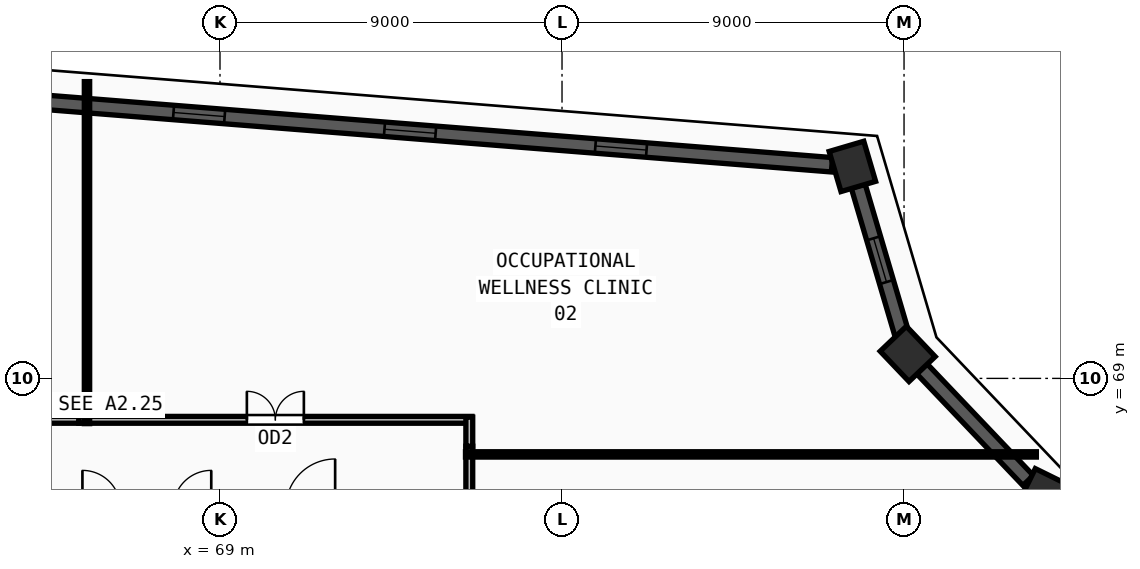
"""IFC4 building model, lengths in metres.
Left out: names, types, materials, properties, quantities, classifications, styles, units other than length and angle.
Written with IfcOpenShell. Run it as: python <this file> out.ifc"""

import sys

from ifc_helpers import new_model, si_unit, direction, frame, frame_2d, origin, origin_2d, place, context, subcontext, project, spatial, rectangle, extrude, source, transform, mapped, element, fill, save


model = new_model("IFC4")
c1 = context("Model", 3, precision=1e-05, world=origin(), true_north=direction((0.0, 1.0)))
c2 = subcontext(c1, "Body", "Model", "MODEL_VIEW")
j1 = project(units=[si_unit("LENGTHUNIT", "METRE"), si_unit("PLANEANGLEUNIT", "RADIAN")], contexts=[c1])
p1 = place(None, origin())
s1 = spatial("IfcSite", under=j1, at=p1, CompositionType="ELEMENT")
p2 = place(p1, origin())
s2 = spatial("IfcBuilding", under=s1, at=p2, CompositionType="ELEMENT")
p3 = place(p2, frame((0.0, 0.0, 286.5)))
s3 = spatial("IfcBuildingStorey", under=s2, at=p3, CompositionType="ELEMENT", Elevation=286.5)
m1 = source(origin(), c2, "Body", "SweptSolid", [
    extrude(rectangle(XDim=1.1, YDim=0.95, at=origin_2d()), origin(), (0.0, 0.0, 1.0), 3.75),
])
for number, where, z_axis, x_axis in (
    (1, (85.641, 74.578, 0.0), (0.0, 0.0, 1.0), (-0.283, 0.959, 0.0)),
    (2, (87.096, 69.644, 0.0), (0.0, 0.0, 1.0), (-0.689, 0.724, 0.0)),
    (3, (90.637, 65.923, 0.0), (0.0, 0.0, 1.0), (0.442, 0.897, 0.0)),
):
    element("IfcColumn", number, at=place(p3, frame(where, z_axis=z_axis, x_axis=x_axis)), inside=s3, PredefinedType="COLUMN", context=c2, shape_type="MappedRepresentation", body=[
        mapped(m1, transform((0.0, 0.0, 0.0), x_axis=(1.0, 0.0, 0.0), y_axis=(0.0, 1.0, 0.0), z_axis=(0.0, 0.0, 1.0), scale=1.0)),
    ])
p4 = place(p3, frame((90.265, 66.314, 0.0), z_axis=(0.0, 0.0, 1.0), x_axis=(-0.689378640733, 0.724401193885, 0.0)))
e4 = element("IfcWall", 4, at=p4, inside=s3, PredefinedType="SOLIDWALL", context=c2, shape_type="SweptSolid", body=[
    extrude(rectangle(XDim=4.057, YDim=0.38, at=frame_2d((2.029, 0.0))), origin(), (0.0, 0.0, 1.0), 3.57),
])
p5 = place(p3, frame((86.943, 70.162, 0.0), z_axis=(0.0, 0.0, 1.0), x_axis=(-0.282780999882, 0.959184500555, 0.0)))
e5 = element("IfcWall", 5, at=p5, inside=s3, PredefinedType="SOLIDWALL", context=c2, shape_type="SweptSolid", body=[
    extrude(rectangle(XDim=4.064, YDim=0.38, at=frame_2d((2.032, 0.0))), origin(), (0.0, 0.0, 1.0), 3.57),
])
m2 = source(origin(), c2, "Body", "SweptSolid", [
    extrude(rectangle(XDim=1.2, YDim=1.9, at=frame_2d((0.6, 0.95))), frame((0.0, 0.2, 0.0), z_axis=(0.0, -1.0, 0.0), x_axis=(1.0, 0.0, 0.0)), (0.0, 0.0, 1.0), 0.4),
])
p6 = place(p5, frame((1.432, 0.0, 0.55)))
e6 = element("IfcOpeningElement", 6, at=p6, cuts=e5, PredefinedType="OPENING", context=c2, shape_type="MappedRepresentation", body=[
    mapped(m2, transform((0.0, 0.0, 0.0), x_axis=(1.0, 0.0, 0.0), y_axis=(0.0, 1.0, 0.0), z_axis=(0.0, 0.0, 1.0), scale=1.0)),
])
p7 = place(p3, frame((85.103, 74.621, 0.0), z_axis=(0.0, 0.0, 1.0), x_axis=(-0.996863155658, 0.079144481122, 0.0)))
e7 = element("IfcWall", 7, at=p7, inside=s3, PredefinedType="SOLIDWALL", context=c2, shape_type="SweptSolid", body=[
    extrude(rectangle(XDim=22.275, YDim=0.38, at=frame_2d((11.137, 0.0))), origin(), (0.0, 0.0, 1.0), 3.57),
])
m3 = source(origin(), c2, "Body", "SweptSolid", [
    extrude(rectangle(XDim=1.35, YDim=1.85, at=frame_2d((0.675, 0.925))), frame((0.0, 0.2, 0.0), z_axis=(0.0, -1.0, 0.0), x_axis=(1.0, 0.0, 0.0)), (0.0, 0.0, 1.0), 0.4),
])
p8 = place(p7, frame((4.894, 0.0, 0.55)))
e8 = element("IfcOpeningElement", 8, at=p8, cuts=e7, PredefinedType="OPENING", context=c2, shape_type="MappedRepresentation", body=[
    mapped(m3, transform((0.0, 0.0, 0.0), x_axis=(1.0, 0.0, 0.0), y_axis=(0.0, 1.0, 0.0), z_axis=(0.0, 0.0, 1.0), scale=1.0)),
])
p9 = place(p7, frame((10.462, 0.0, 0.55)))
e9 = element("IfcOpeningElement", 9, at=p9, cuts=e7, PredefinedType="OPENING", context=c2, shape_type="MappedRepresentation", body=[
    mapped(m3, transform((0.0, 0.0, 0.0), x_axis=(1.0, 0.0, 0.0), y_axis=(0.0, 1.0, 0.0), z_axis=(0.0, 0.0, 1.0), scale=1.0)),
])
p10 = place(p7, frame((16.031, 0.0, 0.55)))
e10 = element("IfcOpeningElement", 10, at=p10, cuts=e7, PredefinedType="OPENING", context=c2, shape_type="MappedRepresentation", body=[
    mapped(m3, transform((0.0, 0.0, 0.0), x_axis=(1.0, 0.0, 0.0), y_axis=(0.0, 1.0, 0.0), z_axis=(0.0, 0.0, 1.0), scale=1.0)),
])
p11 = place(p3, frame((75.56, 67.215, 0.0), z_axis=(0.0, 0.0, 1.0), x_axis=(0.0, -1.0, 0.0)))
e11 = element("IfcWall", 11, at=p11, inside=s3, PredefinedType="PARTITIONING", context=c2, shape_type="SweptSolid", body=[
    extrude(rectangle(XDim=13.93, YDim=0.18, at=frame_2d((6.965, 0.0))), origin(), (0.0, 0.0, 1.0), 3.57),
])
m4 = source(origin(), c2, "Body", "SweptSolid", [
    extrude(rectangle(XDim=1.5, YDim=2.2, at=frame_2d((0.75, 1.1))), frame((0.0, 0.1, 0.0), z_axis=(0.0, -1.0, 0.0), x_axis=(1.0, 0.0, 0.0)), (0.0, 0.0, 1.0), 0.2),
])
p12 = place(p11, frame((6.215, 0.0, 0.0)))
e12 = element("IfcOpeningElement", 12, at=p12, cuts=e11, PredefinedType="OPENING", context=c2, shape_type="MappedRepresentation", body=[
    mapped(m4, transform((0.0, 0.0, 0.0), x_axis=(1.0, 0.0, 0.0), y_axis=(0.0, 1.0, 0.0), z_axis=(0.0, 0.0, 1.0), scale=1.0)),
])
p13 = place(p3, frame((65.285, 67.91, 0.0), z_axis=(0.0, 0.0, 1.0), x_axis=(1.0, 0.0, 0.0)))
e13 = element("IfcWall", 13, at=p13, inside=s3, PredefinedType="PARTITIONING", context=c2, shape_type="SweptSolid", body=[
    extrude(rectangle(XDim=10.345, YDim=0.18, at=frame_2d((5.172, 0.0))), origin(), (0.0, 0.0, 1.0), 3.261),
])
p14 = place(p13, frame((4.422, 0.0, 0.0)))
e14 = element("IfcOpeningElement", 14, at=p14, cuts=e13, PredefinedType="OPENING", context=c2, shape_type="MappedRepresentation", body=[
    mapped(m4, transform((0.0, 0.0, 0.0), x_axis=(1.0, 0.0, 0.0), y_axis=(0.0, 1.0, 0.0), z_axis=(0.0, 0.0, 1.0), scale=1.0)),
])
p15 = place(p3, frame((54.19, 67.91, 0.0), z_axis=(0.0, 0.0, 1.0), x_axis=(1.0, 0.0, 0.0)))
e15 = element("IfcWall", 15, at=p15, inside=s3, PredefinedType="PARTITIONING", context=c2, shape_type="SweptSolid", body=[
    extrude(rectangle(XDim=11.095, YDim=0.18, at=frame_2d((5.547, 0.0))), origin(), (0.0, 0.0, 1.0), 3.261),
])
m5 = source(origin(), c2, "Body", "SweptSolid", [
    extrude(rectangle(XDim=1.0, YDim=2.2, at=frame_2d((0.5, 1.1))), frame((0.0, 0.1, 0.0), z_axis=(0.0, -1.0, 0.0), x_axis=(1.0, 0.0, 0.0)), (0.0, 0.0, 1.0), 0.2),
])
p16 = place(p15, frame((5.047, 0.0, 0.0)))
e16 = element("IfcOpeningElement", 16, at=p16, cuts=e15, PredefinedType="OPENING", context=c2, shape_type="MappedRepresentation", body=[
    mapped(m5, transform((0.0, 0.0, 0.0), x_axis=(1.0, 0.0, 0.0), y_axis=(0.0, 1.0, 0.0), z_axis=(0.0, 0.0, 1.0), scale=1.0)),
])
p17 = place(p3, frame((75.56, 67.98, 0.0), z_axis=(0.0, 0.0, 1.0), x_axis=(0.0, -1.0, 0.0)))
e17 = element("IfcWall", 17, at=p17, inside=s3, PredefinedType="PARTITIONING", context=c2, shape_type="SweptSolid", body=[
    extrude(rectangle(XDim=0.765, YDim=0.18, at=frame_2d((0.382, 0.0))), origin(), (0.0, 0.0, 1.0), 3.57),
])
p18 = place(p3, frame((75.46, 67.0, 0.0), z_axis=(0.0, 0.0, 1.0), x_axis=(1.0, 0.0, 0.0)))
e18 = element("IfcWall", 18, at=p18, inside=s3, PredefinedType="PARTITIONING", context=c2, shape_type="SweptSolid", body=[
    extrude(rectangle(XDim=15.021, YDim=0.14, at=frame_2d((7.51, 0.0))), origin(), (0.0, 0.0, 1.0), 3.57),
])
p19 = place(p3, frame((65.5, 67.81, 0.0), z_axis=(0.0, 0.0, 1.0), x_axis=(0.0, 1.0, 0.0)))
e19 = element("IfcWall", 19, at=p19, inside=s3, PredefinedType="PARTITIONING", context=c2, shape_type="SweptSolid", body=[
    extrude(rectangle(XDim=8.999, YDim=0.14, at=frame_2d((4.5, 0.0))), origin(), (0.0, 0.0, 1.0), 3.57),
])
m6 = source(origin(), c2, "Body", "SweptSolid", [
    extrude(rectangle(XDim=1.2, YDim=1.9, at=frame_2d((0.6, 0.95))), frame((0.0, 0.03, 0.0), z_axis=(0.0, -1.0, 0.0), x_axis=(1.0, 0.0, 0.0)), (0.0, 0.0, 1.0), 0.06),
])
p20 = place(p6, origin())
e20 = element("IfcWindow", 20, at=p20, inside=s3, PartitioningType="SINGLE_PANEL", PredefinedType="WINDOW", context=c2, shape_type="MappedRepresentation", body=[
    mapped(m6, transform((0.0, 0.0, 0.0), x_axis=(1.0, 0.0, 0.0), y_axis=(0.0, 1.0, 0.0), z_axis=(0.0, 0.0, 1.0), scale=1.0)),
])
fill(e6, e20)
m7 = source(origin(), c2, "Body", "SweptSolid", [
    extrude(rectangle(XDim=1.35, YDim=1.85, at=frame_2d((0.675, 0.925))), frame((0.0, 0.03, 0.0), z_axis=(0.0, -1.0, 0.0), x_axis=(1.0, 0.0, 0.0)), (0.0, 0.0, 1.0), 0.06),
])
p21 = place(p8, origin())
e21 = element("IfcWindow", 21, at=p21, inside=s3, PartitioningType="SINGLE_PANEL", PredefinedType="WINDOW", context=c2, shape_type="MappedRepresentation", body=[
    mapped(m7, transform((0.0, 0.0, 0.0), x_axis=(1.0, 0.0, 0.0), y_axis=(0.0, 1.0, 0.0), z_axis=(0.0, 0.0, 1.0), scale=1.0)),
])
fill(e8, e21)
p22 = place(p9, origin())
e22 = element("IfcWindow", 22, at=p22, inside=s3, PartitioningType="SINGLE_PANEL", PredefinedType="WINDOW", context=c2, shape_type="MappedRepresentation", body=[
    mapped(m7, transform((0.0, 0.0, 0.0), x_axis=(1.0, 0.0, 0.0), y_axis=(0.0, 1.0, 0.0), z_axis=(0.0, 0.0, 1.0), scale=1.0)),
])
fill(e9, e22)
p23 = place(p10, origin())
e23 = element("IfcWindow", 23, at=p23, inside=s3, PartitioningType="SINGLE_PANEL", PredefinedType="WINDOW", context=c2, shape_type="MappedRepresentation", body=[
    mapped(m7, transform((0.0, 0.0, 0.0), x_axis=(1.0, 0.0, 0.0), y_axis=(0.0, 1.0, 0.0), z_axis=(0.0, 0.0, 1.0), scale=1.0)),
])
fill(e10, e23)
m8 = source(origin(), c2, "Body", "SweptSolid", [
    extrude(rectangle(XDim=1.5, YDim=2.2, at=frame_2d((0.75, 1.1))), frame((0.0, 0.025, 0.0), z_axis=(0.0, -1.0, 0.0), x_axis=(1.0, 0.0, 0.0)), (0.0, 0.0, 1.0), 0.05),
])
p24 = place(p14, origin())
e24 = element("IfcDoor", 24, at=p24, inside=s3, OperationType="DOUBLE_DOOR_SINGLE_SWING", PredefinedType="DOOR", context=c2, shape_type="MappedRepresentation", body=[
    mapped(m8, transform((0.0, 0.0, 0.0), x_axis=(1.0, 0.0, 0.0), y_axis=(0.0, 1.0, 0.0), z_axis=(0.0, 0.0, 1.0), scale=1.0)),
])
fill(e14, e24)
save(model, sys.argv[1])
